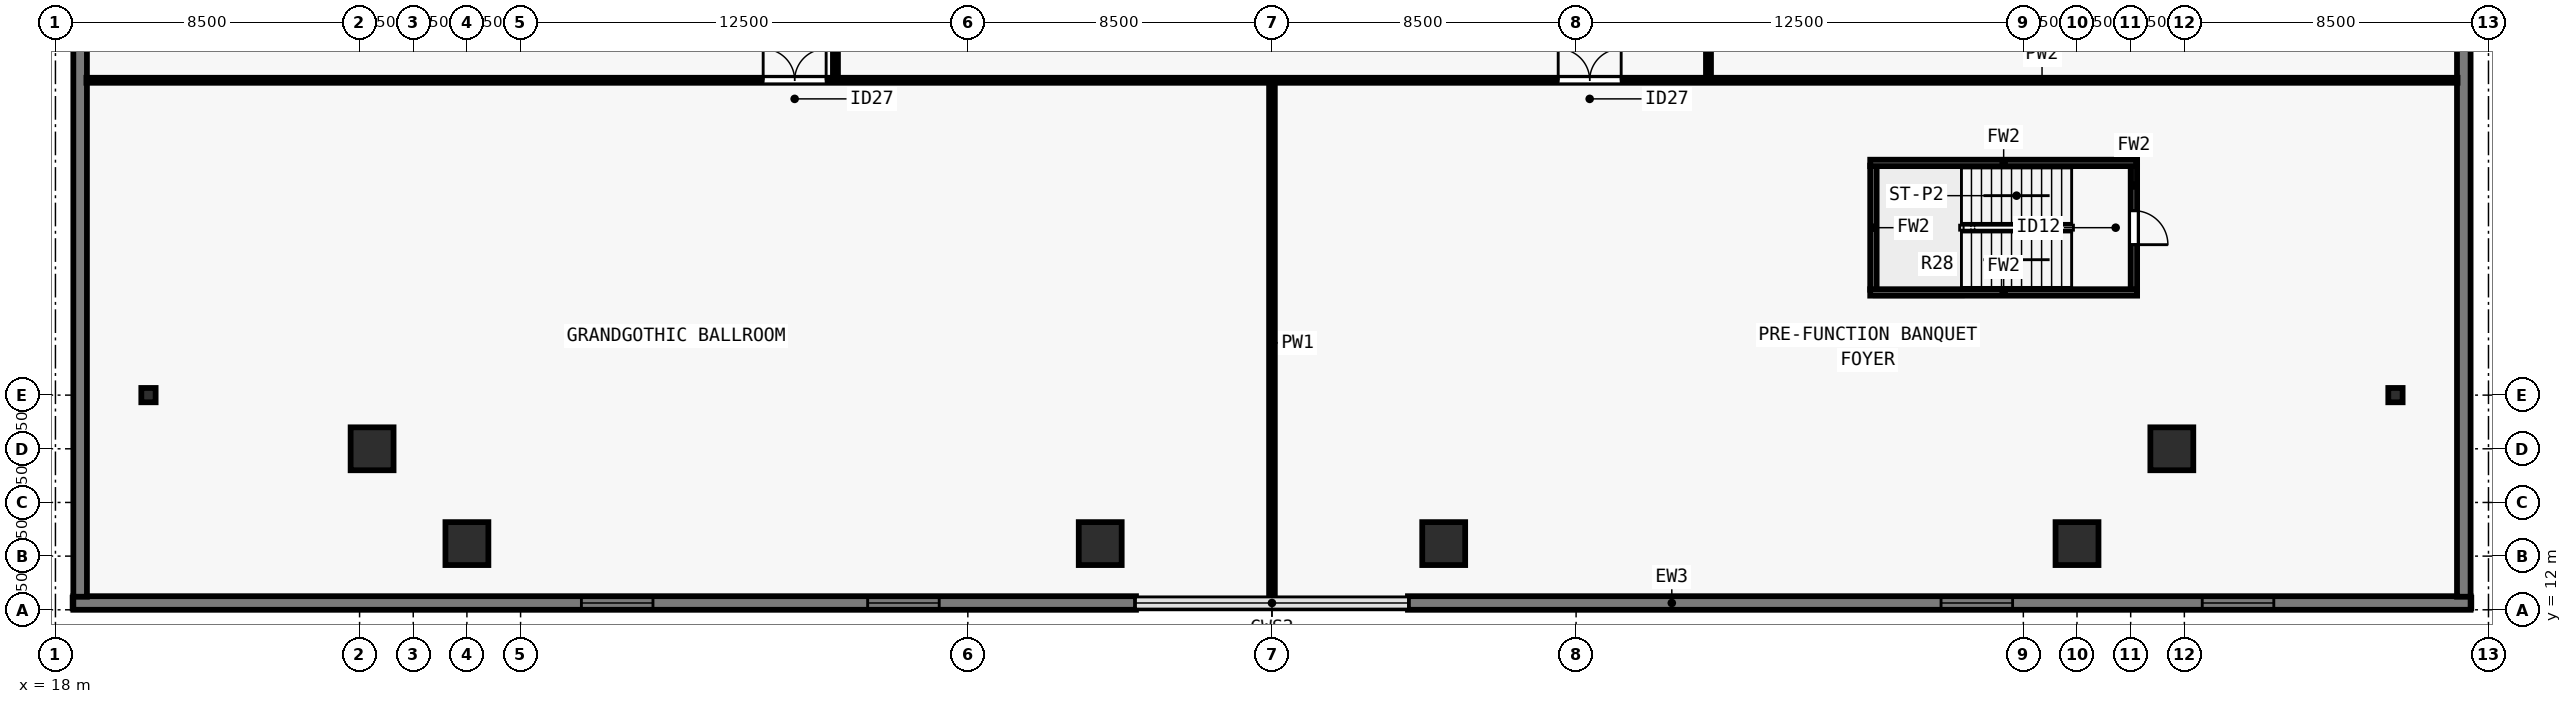
"""IFC4 building model, lengths in metres.
Left out: names, types, materials, properties, quantities, classifications, styles, units other than length and angle.
Written with IfcOpenShell. Run it as: python <this file> out.ifc"""

import sys

from ifc_helpers import new_model, si_unit, direction, frame, frame_2d, origin, origin_2d, place, context, subcontext, project, spatial, rectangle, i_section, extrude, element, fill, save


model = new_model("IFC4")
c1 = context("Model", 3, precision=1e-05, world=origin(), true_north=direction((0.0, 1.0)))
c2 = subcontext(c1, "Body", "Model", "MODEL_VIEW")
j1 = project(units=[si_unit("LENGTHUNIT", "METRE"), si_unit("PLANEANGLEUNIT", "RADIAN")], contexts=[c1])
p1 = place(None, origin())
s1 = spatial("IfcSite", under=j1, at=p1, CompositionType="ELEMENT")
p2 = place(p1, origin())
s2 = spatial("IfcBuilding", under=s1, at=p2, CompositionType="ELEMENT")
p3 = place(p2, frame((0.0, 0.0, 10.0)))
s3 = spatial("IfcBuildingStorey", under=s2, at=p3, CompositionType="ELEMENT", Elevation=10.0)
for number, where, z_axis, x_axis in (
    (1, (29.5, 13.85, 0.0), (0.0, 0.0, 1.0), (1.0, 0.0, 0.0)),
    (2, (47.2, 13.85, 0.0), (0.0, 0.0, 1.0), (1.0, 0.0, 0.0)),
    (3, (56.8, 13.85, 0.0), (0.0, 0.0, 1.0), (1.0, 0.0, 0.0)),
    (4, (74.5, 13.85, 0.0), (0.0, 0.0, 1.0), (1.0, 0.0, 0.0)),
    (5, (77.15, 16.5, 0.0), (0.0, 0.0, 1.0), (1.0, 0.0, 0.0)),
    (6, (26.85, 16.5, 0.0), (0.0, 0.0, 1.0), (1.0, 0.0, 0.0)),
):
    element("IfcColumn", number, at=place(p3, frame(where, z_axis=z_axis, x_axis=x_axis)), inside=s3, PredefinedType="COLUMN", context=c2, shape_type="SweptSolid", body=[
        extrude(rectangle(XDim=1.2, YDim=1.2, at=origin_2d()), origin(), (0.0, 0.0, 1.0), 4.5),
    ])
for number, where, z_axis, x_axis in (
    (7, (20.6, 18.0, 0.0), (0.0, 0.0, 1.0), (1.0, 0.0, 0.0)),
    (8, (83.4, 18.0, 0.0), (0.0, 0.0, 1.0), (1.0, 0.0, 0.0)),
):
    element("IfcColumn", number, at=place(p3, frame(where, z_axis=z_axis, x_axis=x_axis)), inside=s3, PredefinedType="COLUMN", context=c2, shape_type="SweptSolid", body=[
        extrude(i_section(OverallWidth=0.4, OverallDepth=0.4, WebThickness=0.028, FlangeThickness=0.045, at=origin_2d()), origin(), (0.0, 0.0, 1.0), 4.5),
    ])
p4 = place(p3, frame((85.5, 12.19, 0.0), z_axis=(0.0, 0.0, 1.0), x_axis=(-1.0, 0.0, 0.0)))
e9 = element("IfcWall", 9, at=p4, inside=s3, PredefinedType="SOLIDWALL", context=c2, shape_type="SweptSolid", body=[
    extrude(rectangle(XDim=29.7, YDim=0.38, at=frame_2d((14.85, 0.0))), origin(), (0.0, 0.0, 1.0), 4.22),
])
p5 = place(p4, frame((5.5, 0.0, 0.8)))
e10 = element("IfcOpeningElement", 10, at=p5, cuts=e9, PredefinedType="OPENING", context=c2, shape_type="SweptSolid", body=[
    extrude(rectangle(XDim=2.0, YDim=2.346, at=frame_2d((1.0, 1.173))), frame((0.0, 0.2, 0.0), z_axis=(0.0, -1.0, 0.0), x_axis=(1.0, 0.0, 0.0)), (0.0, 0.0, 1.0), 0.4),
])
p6 = place(p4, frame((12.8, 0.0, 0.8)))
e11 = element("IfcOpeningElement", 11, at=p6, cuts=e9, PredefinedType="OPENING", context=c2, shape_type="SweptSolid", body=[
    extrude(rectangle(XDim=2.0, YDim=2.346, at=frame_2d((1.0, 1.173))), frame((0.0, 0.2, 0.0), z_axis=(0.0, -1.0, 0.0), x_axis=(1.0, 0.0, 0.0)), (0.0, 0.0, 1.0), 0.4),
])
p7 = place(p3, frame((48.2, 12.19, 0.0), z_axis=(0.0, 0.0, 1.0), x_axis=(-1.0, 0.0, 0.0)))
e12 = element("IfcWall", 12, at=p7, inside=s3, PredefinedType="SOLIDWALL", context=c2, shape_type="SweptSolid", body=[
    extrude(rectangle(XDim=29.7, YDim=0.38, at=frame_2d((14.85, 0.0))), origin(), (0.0, 0.0, 1.0), 4.22),
])
p8 = place(p7, frame((5.5, 0.0, 0.8)))
e13 = element("IfcOpeningElement", 13, at=p8, cuts=e12, PredefinedType="OPENING", context=c2, shape_type="SweptSolid", body=[
    extrude(rectangle(XDim=2.0, YDim=2.346, at=frame_2d((1.0, 1.173))), frame((0.0, 0.2, 0.0), z_axis=(0.0, -1.0, 0.0), x_axis=(1.0, 0.0, 0.0)), (0.0, 0.0, 1.0), 0.4),
])
p9 = place(p7, frame((13.5, 0.0, 0.8)))
e14 = element("IfcOpeningElement", 14, at=p9, cuts=e12, PredefinedType="OPENING", context=c2, shape_type="SweptSolid", body=[
    extrude(rectangle(XDim=2.0, YDim=2.346, at=frame_2d((1.0, 1.173))), frame((0.0, 0.2, 0.0), z_axis=(0.0, -1.0, 0.0), x_axis=(1.0, 0.0, 0.0)), (0.0, 0.0, 1.0), 0.4),
])
for number, where, z_axis, x_axis in (
    (15, (85.31, 65.635, 0.0), (0.0, 0.0, 1.0), (0.0, -1.0, 0.0)),
    (16, (18.69, 12.365, 0.0), (0.0, 0.0, 1.0), (0.0, 1.0, 0.0)),
):
    element("IfcWall", number, at=place(p3, frame(where, z_axis=z_axis, x_axis=x_axis)), inside=s3, PredefinedType="SOLIDWALL", context=c2, shape_type="SweptSolid", body=[
        extrude(rectangle(XDim=53.27, YDim=0.38, at=frame_2d((26.635, 0.0))), origin(), (0.0, 0.0, 1.0), 4.22),
    ])
p10 = place(p3, frame((18.865, 26.8, 0.0), z_axis=(0.0, 0.0, 1.0), x_axis=(1.0, 0.0, 0.0)))
e17 = element("IfcWall", 17, at=p10, inside=s3, PredefinedType="PARTITIONING", context=c2, shape_type="SweptSolid", body=[
    extrude(rectangle(XDim=66.27, YDim=0.14, at=frame_2d((33.135, 0.0))), origin(), (0.0, 0.0, 1.0), 3.738),
])
p11 = place(p10, frame((18.915, 0.0, 0.0)))
e18 = element("IfcOpeningElement", 18, at=p11, cuts=e17, PredefinedType="OPENING", context=c2, shape_type="SweptSolid", body=[
    extrude(rectangle(XDim=1.76, YDim=2.2, at=frame_2d((0.88, 1.1))), frame((0.0, 0.08, 0.0), z_axis=(0.0, -1.0, 0.0), x_axis=(1.0, 0.0, 0.0)), (0.0, 0.0, 1.0), 0.16),
])
p12 = place(p10, frame((41.135, 0.0, 0.0)))
e19 = element("IfcOpeningElement", 19, at=p12, cuts=e17, PredefinedType="OPENING", context=c2, shape_type="SweptSolid", body=[
    extrude(rectangle(XDim=1.76, YDim=2.2, at=frame_2d((0.88, 1.1))), frame((0.0, 0.08, 0.0), z_axis=(0.0, -1.0, 0.0), x_axis=(1.0, 0.0, 0.0)), (0.0, 0.0, 1.0), 0.16),
])
p13 = place(p3, frame((39.8, 26.855, 0.0), z_axis=(0.0, 0.0, 1.0), x_axis=(0.0, 1.0, 0.0)))
e20 = element("IfcWall", 20, at=p13, inside=s3, PredefinedType="PARTITIONING", context=c2, shape_type="SweptSolid", body=[
    extrude(rectangle(XDim=24.29, YDim=0.14, at=frame_2d((12.145, 0.0))), origin(), (0.0, 0.0, 1.0), 4.22),
])
p14 = place(p13, frame((10.945, 0.0, 0.0)))
e21 = element("IfcOpeningElement", 21, at=p14, cuts=e20, PredefinedType="OPENING", context=c2, shape_type="SweptSolid", body=[
    extrude(rectangle(XDim=1.76, YDim=2.2, at=frame_2d((0.88, 1.1))), frame((0.0, 0.08, 0.0), z_axis=(0.0, -1.0, 0.0), x_axis=(1.0, 0.0, 0.0)), (0.0, 0.0, 1.0), 0.16),
])
p15 = place(p3, frame((64.2, 26.855, 0.0), z_axis=(0.0, 0.0, 1.0), x_axis=(0.0, 1.0, 0.0)))
e22 = element("IfcWall", 22, at=p15, inside=s3, PredefinedType="PARTITIONING", context=c2, shape_type="SweptSolid", body=[
    extrude(rectangle(XDim=24.29, YDim=0.14, at=frame_2d((12.145, 0.0))), origin(), (0.0, 0.0, 1.0), 4.22),
])
p16 = place(p15, frame((10.945, 0.0, 0.0)))
e23 = element("IfcOpeningElement", 23, at=p16, cuts=e22, PredefinedType="OPENING", context=c2, shape_type="SweptSolid", body=[
    extrude(rectangle(XDim=1.76, YDim=2.2, at=frame_2d((0.88, 1.1))), frame((0.0, 0.08, 0.0), z_axis=(0.0, -1.0, 0.0), x_axis=(1.0, 0.0, 0.0)), (0.0, 0.0, 1.0), 0.16),
])
p17 = place(p3, frame((52.0, 12.22, 0.0), z_axis=(0.0, 0.0, 1.0), x_axis=(0.0, 1.0, 0.0)))
e24 = element("IfcWall", 24, at=p17, inside=s3, PredefinedType="PARTITIONING", context=c2, shape_type="SweptSolid", body=[
    extrude(rectangle(XDim=14.48, YDim=0.16, at=frame_2d((7.24, 0.0))), origin(), (0.0, 0.0, 1.0), 4.22),
])
p18 = place(p3, frame((76.09, 24.415, 0.0), z_axis=(0.0, 0.0, 1.0), x_axis=(0.0, -1.0, 0.0)))
e25 = element("IfcWall", 25, at=p18, inside=s3, PredefinedType="SOLIDWALL", context=c2, shape_type="SweptSolid", body=[
    extrude(rectangle(XDim=3.47, YDim=0.18, at=frame_2d((1.735, 0.0))), origin(), (0.0, 0.0, 1.0), 4.22),
])
p19 = place(p18, frame((1.26, 0.0, 0.0)))
e26 = element("IfcOpeningElement", 26, at=p19, cuts=e25, PredefinedType="OPENING", context=c2, shape_type="SweptSolid", body=[
    extrude(rectangle(XDim=0.95, YDim=2.15, at=frame_2d((0.475, 1.075))), frame((0.0, 0.1, 0.0), z_axis=(0.0, -1.0, 0.0), x_axis=(1.0, 0.0, 0.0)), (0.0, 0.0, 1.0), 0.2),
])
p20 = place(p3, frame((68.81, 24.415, 0.0), z_axis=(0.0, 0.0, 1.0), x_axis=(0.0, -1.0, 0.0)))
e27 = element("IfcWall", 27, at=p20, inside=s3, PredefinedType="SOLIDWALL", context=c2, shape_type="SweptSolid", body=[
    extrude(rectangle(XDim=3.47, YDim=0.18, at=frame_2d((1.735, 0.0))), origin(), (0.0, 0.0, 1.0), 4.22),
])
for number, where, z_axis, x_axis in (
    (28, (76.18, 24.49, 0.0), (0.0, 0.0, 1.0), (-1.0, 0.0, 0.0)),
    (29, (76.18, 20.87, 0.0), (0.0, 0.0, 1.0), (-1.0, 0.0, 0.0)),
):
    element("IfcWall", number, at=place(p3, frame(where, z_axis=z_axis, x_axis=x_axis)), inside=s3, PredefinedType="SOLIDWALL", context=c2, shape_type="SweptSolid", body=[
        extrude(rectangle(XDim=7.46, YDim=0.18, at=frame_2d((3.73, 0.0))), origin(), (0.0, 0.0, 1.0), 4.22),
    ])
p21 = place(p5, origin())
e30 = element("IfcWindow", 30, at=p21, inside=s3, PartitioningType="SINGLE_PANEL", PredefinedType="WINDOW", context=c2, shape_type="SweptSolid", body=[
    extrude(rectangle(XDim=2.0, YDim=2.346, at=frame_2d((1.0, 1.173))), frame((0.0, -0.05, 0.0), z_axis=(0.0, -1.0, 0.0), x_axis=(1.0, 0.0, 0.0)), (0.0, 0.0, 1.0), 0.06),
])
fill(e10, e30)
p22 = place(p6, origin())
e31 = element("IfcWindow", 31, at=p22, inside=s3, PartitioningType="SINGLE_PANEL", PredefinedType="WINDOW", context=c2, shape_type="SweptSolid", body=[
    extrude(rectangle(XDim=2.0, YDim=2.346, at=frame_2d((1.0, 1.173))), frame((0.0, -0.05, 0.0), z_axis=(0.0, -1.0, 0.0), x_axis=(1.0, 0.0, 0.0)), (0.0, 0.0, 1.0), 0.06),
])
fill(e11, e31)
p23 = place(p8, origin())
e32 = element("IfcWindow", 32, at=p23, inside=s3, PartitioningType="SINGLE_PANEL", PredefinedType="WINDOW", context=c2, shape_type="SweptSolid", body=[
    extrude(rectangle(XDim=2.0, YDim=2.346, at=frame_2d((1.0, 1.173))), frame((0.0, -0.05, 0.0), z_axis=(0.0, -1.0, 0.0), x_axis=(1.0, 0.0, 0.0)), (0.0, 0.0, 1.0), 0.06),
])
fill(e13, e32)
p24 = place(p9, origin())
e33 = element("IfcWindow", 33, at=p24, inside=s3, PartitioningType="SINGLE_PANEL", PredefinedType="WINDOW", context=c2, shape_type="SweptSolid", body=[
    extrude(rectangle(XDim=2.0, YDim=2.346, at=frame_2d((1.0, 1.173))), frame((0.0, -0.05, 0.0), z_axis=(0.0, -1.0, 0.0), x_axis=(1.0, 0.0, 0.0)), (0.0, 0.0, 1.0), 0.06),
])
fill(e14, e33)
p25 = place(p11, origin())
e34 = element("IfcDoor", 34, at=p25, inside=s3, OperationType="DOUBLE_DOOR_SINGLE_SWING", PredefinedType="DOOR", context=c2, shape_type="SweptSolid", body=[
    extrude(rectangle(XDim=1.76, YDim=2.2, at=frame_2d((0.88, 1.1))), frame((0.0, 0.025, 0.0), z_axis=(0.0, -1.0, 0.0), x_axis=(1.0, 0.0, 0.0)), (0.0, 0.0, 1.0), 0.05),
])
fill(e18, e34)
p26 = place(p12, origin())
e35 = element("IfcDoor", 35, at=p26, inside=s3, OperationType="DOUBLE_DOOR_SINGLE_SWING", PredefinedType="DOOR", context=c2, shape_type="SweptSolid", body=[
    extrude(rectangle(XDim=1.76, YDim=2.2, at=frame_2d((0.88, 1.1))), frame((0.0, 0.025, 0.0), z_axis=(0.0, -1.0, 0.0), x_axis=(1.0, 0.0, 0.0)), (0.0, 0.0, 1.0), 0.05),
])
fill(e19, e35)
p27 = place(p19, origin())
e36 = element("IfcDoor", 36, at=p27, inside=s3, OperationType="SINGLE_SWING_RIGHT", PredefinedType="DOOR", context=c2, shape_type="SweptSolid", body=[
    extrude(rectangle(XDim=0.95, YDim=2.15, at=frame_2d((0.475, 1.075))), frame((0.0, 0.025, 0.0), z_axis=(0.0, -1.0, 0.0), x_axis=(1.0, 0.0, 0.0)), (0.0, 0.0, 1.0), 0.05),
])
fill(e26, e36)
save(model, sys.argv[1])
